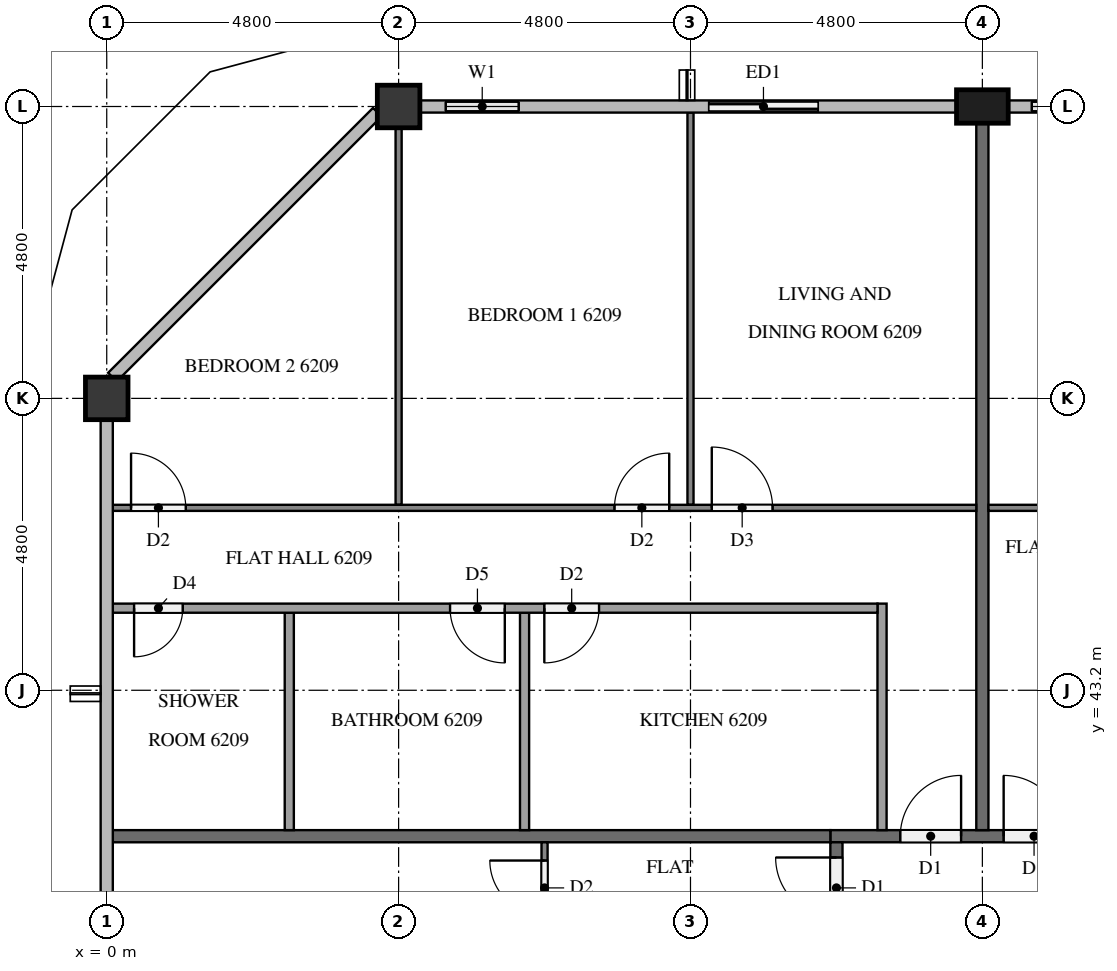
"""IFC4 building model, lengths in metres.
Left out: names, types, materials, properties, quantities, classifications, styles, units other than length and angle.
Written with IfcOpenShell. Run it as: python <this file> out.ifc"""

import sys

from ifc_helpers import new_model, si_unit, direction, frame, frame_2d, origin, origin_2d, place, context, subcontext, project, spatial, rectangle, extrude, element, fill, save


model = new_model("IFC4")
c1 = context("Model", 3, precision=1e-05, world=origin(), true_north=direction((0.0, 1.0)))
c2 = subcontext(c1, "Body", "Model", "MODEL_VIEW")
j1 = project(units=[si_unit("LENGTHUNIT", "METRE"), si_unit("PLANEANGLEUNIT", "RADIAN")], contexts=[c1])
p1 = place(None, origin())
s1 = spatial("IfcSite", under=j1, at=p1, CompositionType="ELEMENT")
p2 = place(p1, origin())
s2 = spatial("IfcBuilding", under=s1, at=p2, CompositionType="ELEMENT")
p3 = place(p2, frame((0.0, 0.0, 238.7)))
s3 = spatial("IfcBuildingStorey", under=s2, at=p3, CompositionType="ELEMENT", Elevation=238.7)
p4 = place(p3, frame((14.4, 52.8, 0.0), z_axis=(0.0, 0.0, 1.0), x_axis=(1.0, 0.0, 0.0)))
e1 = element("IfcColumn", 1, at=p4, inside=s3, PredefinedType="COLUMN", context=c2, shape_type="SweptSolid", body=[
    extrude(rectangle(XDim=0.85, YDim=0.55, at=origin_2d()), origin(), (0.0, 0.0, 1.0), 3.2),
])
for number, where, z_axis, x_axis in (
    (2, (4.8, 52.8, 0.0), (0.0, 0.0, 1.0), (1.0, 0.0, 0.0)),
    (3, (0.0, 48.0, 0.0), (0.0, 0.0, 1.0), (1.0, 0.0, 0.0)),
):
    element("IfcColumn", number, at=place(p3, frame(where, z_axis=z_axis, x_axis=x_axis)), inside=s3, PredefinedType="COLUMN", context=c2, shape_type="SweptSolid", body=[
        extrude(rectangle(XDim=0.7, YDim=0.7, at=origin_2d()), origin(), (0.0, 0.0, 1.0), 3.2),
    ])
p5 = place(p3, frame((16.8, 52.8, 0.0), z_axis=(0.0, 0.0, 1.0), x_axis=(-1.0, 0.0, 0.0)))
e4 = element("IfcWall", 4, at=p5, inside=s3, PredefinedType="SOLIDWALL", context=c2, shape_type="SweptSolid", body=[
    extrude(rectangle(XDim=1.975, YDim=0.15, at=frame_2d((0.988, 0.0))), origin(), (0.0, 0.0, 1.0), 3.2),
])
p6 = place(p5, frame((0.387, 0.0, 0.9)))
e5 = element("IfcOpeningElement", 5, at=p6, cuts=e4, PredefinedType="OPENING", context=c2, shape_type="SweptSolid", body=[
    extrude(rectangle(XDim=1.2, YDim=1.4, at=frame_2d((0.6, 0.7))), frame((0.0, 0.085, 0.0), z_axis=(0.0, -1.0, 0.0), x_axis=(1.0, 0.0, 0.0)), (0.0, 0.0, 1.0), 0.17),
])
p7 = place(p3, frame((12.0, 52.8, 0.0), z_axis=(0.0, 0.0, 1.0), x_axis=(-1.0, 0.0, 0.0)))
e6 = element("IfcWall", 6, at=p7, inside=s3, PredefinedType="SOLIDWALL", context=c2, shape_type="SweptSolid", body=[
    extrude(rectangle(XDim=2.4, YDim=0.15, at=frame_2d((1.2, 0.0))), origin(), (0.0, 0.0, 1.0), 3.2),
])
p8 = place(p7, frame((0.3, 0.0, 0.0)))
e7 = element("IfcOpeningElement", 7, at=p8, cuts=e6, PredefinedType="OPENING", context=c2, shape_type="SweptSolid", body=[
    extrude(rectangle(XDim=1.8, YDim=2.4, at=frame_2d((0.9, 1.2))), frame((0.0, 0.085, 0.0), z_axis=(0.0, -1.0, 0.0), x_axis=(1.0, 0.0, 0.0)), (0.0, 0.0, 1.0), 0.17),
])
p9 = place(p3, frame((7.2, 52.8, 0.0), z_axis=(0.0, 0.0, 1.0), x_axis=(-1.0, 0.0, 0.0)))
e8 = element("IfcWall", 8, at=p9, inside=s3, PredefinedType="SOLIDWALL", context=c2, shape_type="SweptSolid", body=[
    extrude(rectangle(XDim=2.05, YDim=0.15, at=frame_2d((1.025, 0.0))), origin(), (0.0, 0.0, 1.0), 3.2),
])
p10 = place(p9, frame((0.425, 0.0, 0.9)))
e9 = element("IfcOpeningElement", 9, at=p10, cuts=e8, PredefinedType="OPENING", context=c2, shape_type="SweptSolid", body=[
    extrude(rectangle(XDim=1.2, YDim=1.4, at=frame_2d((0.6, 0.7))), frame((0.0, 0.085, 0.0), z_axis=(0.0, -1.0, 0.0), x_axis=(1.0, 0.0, 0.0)), (0.0, 0.0, 1.0), 0.17),
])
p11 = place(p3, frame((11.9, 40.8, 0.0), z_axis=(0.0, 0.0, 1.0), x_axis=(1.0, 0.0, 0.0)))
e10 = element("IfcWall", 10, at=p11, inside=s3, PredefinedType="PARTITIONING", context=c2, shape_type="SweptSolid", body=[
    extrude(rectangle(XDim=38.6, YDim=0.2, at=frame_2d((19.3, 0.0))), origin(), (0.0, 0.0, 1.0), 3.2),
])
p12 = place(p11, frame((34.05, 0.0, 0.0)))
e11 = element("IfcOpeningElement", 11, at=p12, cuts=e10, PredefinedType="OPENING", context=c2, shape_type="SweptSolid", body=[
    extrude(rectangle(XDim=1.0, YDim=2.1, at=frame_2d((0.5, 1.05))), frame((0.0, 0.11, 0.0), z_axis=(0.0, -1.0, 0.0), x_axis=(1.0, 0.0, 0.0)), (0.0, 0.0, 1.0), 0.22),
])
p13 = place(p11, frame((32.3, 0.0, 0.0)))
e12 = element("IfcOpeningElement", 12, at=p13, cuts=e10, PredefinedType="OPENING", context=c2, shape_type="SweptSolid", body=[
    extrude(rectangle(XDim=1.1, YDim=2.1, at=frame_2d((0.55, 1.05))), frame((0.0, 0.11, 0.0), z_axis=(0.0, -1.0, 0.0), x_axis=(1.0, 0.0, 0.0)), (0.0, 0.0, 1.0), 0.22),
])
p14 = place(p11, frame((2.85, 0.0, 0.0)))
e13 = element("IfcOpeningElement", 13, at=p14, cuts=e10, PredefinedType="OPENING", context=c2, shape_type="SweptSolid", body=[
    extrude(rectangle(XDim=1.0, YDim=2.1, at=frame_2d((0.5, 1.05))), frame((0.0, 0.11, 0.0), z_axis=(0.0, -1.0, 0.0), x_axis=(1.0, 0.0, 0.0)), (0.0, 0.0, 1.0), 0.22),
])
p15 = place(p11, frame((1.15, 0.0, 0.0)))
e14 = element("IfcOpeningElement", 14, at=p15, cuts=e10, PredefinedType="OPENING", context=c2, shape_type="SweptSolid", body=[
    extrude(rectangle(XDim=1.0, YDim=2.1, at=frame_2d((0.5, 1.05))), frame((0.0, 0.11, 0.0), z_axis=(0.0, -1.0, 0.0), x_axis=(1.0, 0.0, 0.0)), (0.0, 0.0, 1.0), 0.22),
])
p16 = place(p3, frame((12.0, 12.1, 0.0), z_axis=(0.0, 0.0, 1.0), x_axis=(0.0, 1.0, 0.0)))
e15 = element("IfcWall", 15, at=p16, inside=s3, PredefinedType="PARTITIONING", context=c2, shape_type="SweptSolid", body=[
    extrude(rectangle(XDim=28.6, YDim=0.2, at=frame_2d((14.3, 0.0))), origin(), (0.0, 0.0, 1.0), 3.2),
])
p17 = place(p16, frame((27.35, 0.0, 0.0)))
e16 = element("IfcOpeningElement", 16, at=p17, cuts=e15, PredefinedType="OPENING", context=c2, shape_type="SweptSolid", body=[
    extrude(rectangle(XDim=1.0, YDim=2.1, at=frame_2d((0.5, 1.05))), frame((0.0, 0.11, 0.0), z_axis=(0.0, -1.0, 0.0), x_axis=(1.0, 0.0, 0.0)), (0.0, 0.0, 1.0), 0.22),
])
p18 = place(p16, frame((17.75, 0.0, 0.0)))
e17 = element("IfcOpeningElement", 17, at=p18, cuts=e15, PredefinedType="OPENING", context=c2, shape_type="SweptSolid", body=[
    extrude(rectangle(XDim=1.0, YDim=2.1, at=frame_2d((0.5, 1.05))), frame((0.0, 0.11, 0.0), z_axis=(0.0, -1.0, 0.0), x_axis=(1.0, 0.0, 0.0)), (0.0, 0.0, 1.0), 0.22),
])
p19 = place(p16, frame((3.35, 0.0, 0.0)))
e18 = element("IfcOpeningElement", 18, at=p19, cuts=e15, PredefinedType="OPENING", context=c2, shape_type="SweptSolid", body=[
    extrude(rectangle(XDim=1.0, YDim=2.1, at=frame_2d((0.5, 1.05))), frame((0.0, 0.11, 0.0), z_axis=(0.0, -1.0, 0.0), x_axis=(1.0, 0.0, 0.0)), (0.0, 0.0, 1.0), 0.22),
])
p20 = place(p3, frame((14.4, 52.525, 0.0), z_axis=(0.0, 0.0, 1.0), x_axis=(0.0, -1.0, 0.0)))
e19 = element("IfcWall", 19, at=p20, inside=s3, PredefinedType="PARTITIONING", context=c2, shape_type="SweptSolid", body=[
    extrude(rectangle(XDim=11.625, YDim=0.2, at=frame_2d((5.812, 0.0))), origin(), (0.0, 0.0, 1.0), 3.2),
])
p21 = place(p3, frame((0.1, 40.8, 0.0), z_axis=(0.0, 0.0, 1.0), x_axis=(1.0, 0.0, 0.0)))
e20 = element("IfcWall", 20, at=p21, inside=s3, PredefinedType="PARTITIONING", context=c2, shape_type="SweptSolid", body=[
    extrude(rectangle(XDim=11.8, YDim=0.2, at=frame_2d((5.9, 0.0))), origin(), (0.0, 0.0, 1.0), 3.2),
])
p22 = place(p3, frame((14.5, 46.2, 0.0), z_axis=(0.0, 0.0, 1.0), x_axis=(1.0, 0.0, 0.0)))
e21 = element("IfcWall", 21, at=p22, inside=s3, PredefinedType="PARTITIONING", context=c2, shape_type="SweptSolid", body=[
    extrude(rectangle(XDim=11.8, YDim=0.1, at=frame_2d((5.9, 0.0))), origin(), (0.0, 0.0, 1.0), 3.2),
])
p23 = place(p22, frame((3.45, 0.0, 0.0)))
e22 = element("IfcOpeningElement", 22, at=p23, cuts=e21, PredefinedType="OPENING", context=c2, shape_type="SweptSolid", body=[
    extrude(rectangle(XDim=0.9, YDim=2.1, at=frame_2d((0.45, 1.05))), frame((0.0, 0.06, 0.0), z_axis=(0.0, -1.0, 0.0), x_axis=(1.0, 0.0, 0.0)), (0.0, 0.0, 1.0), 0.12),
])
p24 = place(p22, frame((5.05, 0.0, 0.0)))
e23 = element("IfcOpeningElement", 23, at=p24, cuts=e21, PredefinedType="OPENING", context=c2, shape_type="SweptSolid", body=[
    extrude(rectangle(XDim=1.0, YDim=2.1, at=frame_2d((0.5, 1.05))), frame((0.0, 0.06, 0.0), z_axis=(0.0, -1.0, 0.0), x_axis=(1.0, 0.0, 0.0)), (0.0, 0.0, 1.0), 0.12),
])
p25 = place(p3, frame((9.6, 46.25, 0.0), z_axis=(0.0, 0.0, 1.0), x_axis=(0.0, 1.0, 0.0)))
e24 = element("IfcWall", 24, at=p25, inside=s3, PredefinedType="PARTITIONING", context=c2, shape_type="SweptSolid", body=[
    extrude(rectangle(XDim=6.45, YDim=0.1, at=frame_2d((3.225, 0.0))), origin(), (0.0, 0.0, 1.0), 3.2),
])
p26 = place(p3, frame((4.8, 46.25, 0.0), z_axis=(0.0, 0.0, 1.0), x_axis=(0.0, 1.0, 0.0)))
e25 = element("IfcWall", 25, at=p26, inside=s3, PredefinedType="PARTITIONING", context=c2, shape_type="SweptSolid", body=[
    extrude(rectangle(XDim=6.2, YDim=0.1, at=frame_2d((3.1, 0.0))), origin(), (0.0, 0.0, 1.0), 3.2),
])
p27 = place(p3, frame((0.1, 46.2, 0.0), z_axis=(0.0, 0.0, 1.0), x_axis=(1.0, 0.0, 0.0)))
e26 = element("IfcWall", 26, at=p27, inside=s3, PredefinedType="PARTITIONING", context=c2, shape_type="SweptSolid", body=[
    extrude(rectangle(XDim=14.2, YDim=0.1, at=frame_2d((7.1, 0.0))), origin(), (0.0, 0.0, 1.0), 3.2),
])
p28 = place(p27, frame((9.85, 0.0, 0.0)))
e27 = element("IfcOpeningElement", 27, at=p28, cuts=e26, PredefinedType="OPENING", context=c2, shape_type="SweptSolid", body=[
    extrude(rectangle(XDim=1.0, YDim=2.1, at=frame_2d((0.5, 1.05))), frame((0.0, 0.06, 0.0), z_axis=(0.0, -1.0, 0.0), x_axis=(1.0, 0.0, 0.0)), (0.0, 0.0, 1.0), 0.12),
])
p29 = place(p27, frame((8.25, 0.0, 0.0)))
e28 = element("IfcOpeningElement", 28, at=p29, cuts=e26, PredefinedType="OPENING", context=c2, shape_type="SweptSolid", body=[
    extrude(rectangle(XDim=0.9, YDim=2.1, at=frame_2d((0.45, 1.05))), frame((0.0, 0.06, 0.0), z_axis=(0.0, -1.0, 0.0), x_axis=(1.0, 0.0, 0.0)), (0.0, 0.0, 1.0), 0.12),
])
p30 = place(p27, frame((0.3, 0.0, 0.0)))
e29 = element("IfcOpeningElement", 29, at=p30, cuts=e26, PredefinedType="OPENING", context=c2, shape_type="SweptSolid", body=[
    extrude(rectangle(XDim=0.9, YDim=2.1, at=frame_2d((0.45, 1.05))), frame((0.0, 0.06, 0.0), z_axis=(0.0, -1.0, 0.0), x_axis=(1.0, 0.0, 0.0)), (0.0, 0.0, 1.0), 0.12),
])
for number, where, z_axis, x_axis in (
    (30, (6.871, 40.9, 0.0), (0.0, 0.0, 1.0), (0.0, 1.0, 0.0)),
    (31, (3.002, 40.9, 0.0), (0.0, 0.0, 1.0), (0.0, 1.0, 0.0)),
):
    element("IfcWall", number, at=place(p3, frame(where, z_axis=z_axis, x_axis=x_axis)), inside=s3, PredefinedType="PARTITIONING", context=c2, shape_type="SweptSolid", body=[
        extrude(rectangle(XDim=3.575, YDim=0.15, at=frame_2d((1.788, 0.0))), origin(), (0.0, 0.0, 1.0), 3.2),
    ])
p31 = place(p3, frame((12.75, 40.9, 0.0), z_axis=(0.0, 0.0, 1.0), x_axis=(0.0, 1.0, 0.0)))
e32 = element("IfcWall", 32, at=p31, inside=s3, PredefinedType="PARTITIONING", context=c2, shape_type="SweptSolid", body=[
    extrude(rectangle(XDim=3.725, YDim=0.15, at=frame_2d((1.863, 0.0))), origin(), (0.0, 0.0, 1.0), 3.2),
])
p32 = place(p3, frame((12.675, 44.55, 0.0), z_axis=(0.0, 0.0, 1.0), x_axis=(-1.0, 0.0, 0.0)))
e33 = element("IfcWall", 33, at=p32, inside=s3, PredefinedType="PARTITIONING", context=c2, shape_type="SweptSolid", body=[
    extrude(rectangle(XDim=12.575, YDim=0.15, at=frame_2d((6.288, 0.0))), origin(), (0.0, 0.0, 1.0), 3.2),
])
p33 = place(p32, frame((4.579, 0.0, 0.0)))
e34 = element("IfcOpeningElement", 34, at=p33, cuts=e33, PredefinedType="OPENING", context=c2, shape_type="SweptSolid", body=[
    extrude(rectangle(XDim=0.9, YDim=2.1, at=frame_2d((0.45, 1.05))), frame((0.0, 0.085, 0.0), z_axis=(0.0, -1.0, 0.0), x_axis=(1.0, 0.0, 0.0)), (0.0, 0.0, 1.0), 0.17),
])
p34 = place(p32, frame((6.129, 0.0, 0.0)))
e35 = element("IfcOpeningElement", 35, at=p34, cuts=e33, PredefinedType="OPENING", context=c2, shape_type="SweptSolid", body=[
    extrude(rectangle(XDim=0.9, YDim=2.1, at=frame_2d((0.45, 1.05))), frame((0.0, 0.085, 0.0), z_axis=(0.0, -1.0, 0.0), x_axis=(1.0, 0.0, 0.0)), (0.0, 0.0, 1.0), 0.17),
])
p35 = place(p32, frame((11.425, 0.0, 0.0)))
e36 = element("IfcOpeningElement", 36, at=p35, cuts=e33, PredefinedType="OPENING", context=c2, shape_type="SweptSolid", body=[
    extrude(rectangle(XDim=0.8, YDim=2.1, at=frame_2d((0.4, 1.05))), frame((0.0, 0.085, 0.0), z_axis=(0.0, -1.0, 0.0), x_axis=(1.0, 0.0, 0.0)), (0.0, 0.0, 1.0), 0.17),
])
p36 = place(p3, frame((7.2, 31.3, 0.0), z_axis=(0.0, 0.0, 1.0), x_axis=(0.0, 1.0, 0.0)))
e37 = element("IfcWall", 37, at=p36, inside=s3, PredefinedType="PARTITIONING", context=c2, shape_type="SweptSolid", body=[
    extrude(rectangle(XDim=9.4, YDim=0.1, at=frame_2d((4.7, 0.0))), origin(), (0.0, 0.0, 1.0), 3.2),
])
p37 = place(p36, frame((8.2, 0.0, 0.0)))
e38 = element("IfcOpeningElement", 38, at=p37, cuts=e37, PredefinedType="OPENING", context=c2, shape_type="SweptSolid", body=[
    extrude(rectangle(XDim=0.9, YDim=2.1, at=frame_2d((0.45, 1.05))), frame((0.0, 0.06, 0.0), z_axis=(0.0, -1.0, 0.0), x_axis=(1.0, 0.0, 0.0)), (0.0, 0.0, 1.0), 0.12),
])
p38 = place(p36, frame((0.3, 0.0, 0.0)))
e39 = element("IfcOpeningElement", 39, at=p38, cuts=e37, PredefinedType="OPENING", context=c2, shape_type="SweptSolid", body=[
    extrude(rectangle(XDim=1.0, YDim=2.1, at=frame_2d((0.5, 1.05))), frame((0.0, 0.06, 0.0), z_axis=(0.0, -1.0, 0.0), x_axis=(1.0, 0.0, 0.0)), (0.0, 0.0, 1.0), 0.12),
])
p39 = place(p6, origin())
e40 = element("IfcWindow", 40, at=p39, inside=s3, PartitioningType="SINGLE_PANEL", PredefinedType="WINDOW", context=c2, shape_type="SweptSolid", body=[
    extrude(rectangle(XDim=1.2, YDim=1.4, at=frame_2d((0.6, 0.7))), frame((0.0, 0.03, 0.0), z_axis=(0.0, -1.0, 0.0), x_axis=(1.0, 0.0, 0.0)), (0.0, 0.0, 1.0), 0.06),
])
fill(e5, e40)
p40 = place(p8, origin())
e41 = element("IfcDoor", 41, at=p40, inside=s3, OperationType="SLIDING_TO_RIGHT", PredefinedType="DOOR", context=c2, shape_type="SweptSolid", body=[
    extrude(rectangle(XDim=1.8, YDim=2.4, at=frame_2d((0.9, 1.2))), frame((0.0, 0.025, 0.0), z_axis=(0.0, -1.0, 0.0), x_axis=(1.0, 0.0, 0.0)), (0.0, 0.0, 1.0), 0.05),
])
fill(e7, e41)
p41 = place(p10, origin())
e42 = element("IfcWindow", 42, at=p41, inside=s3, PartitioningType="SINGLE_PANEL", PredefinedType="WINDOW", context=c2, shape_type="SweptSolid", body=[
    extrude(rectangle(XDim=1.2, YDim=1.4, at=frame_2d((0.6, 0.7))), frame((0.0, 0.03, 0.0), z_axis=(0.0, -1.0, 0.0), x_axis=(1.0, 0.0, 0.0)), (0.0, 0.0, 1.0), 0.06),
])
fill(e9, e42)
p42 = place(p14, origin())
e43 = element("IfcDoor", 43, at=p42, inside=s3, OperationType="SINGLE_SWING_LEFT", PredefinedType="DOOR", context=c2, shape_type="SweptSolid", body=[
    extrude(rectangle(XDim=1.0, YDim=2.1, at=frame_2d((0.5, 1.05))), frame((0.0, 0.025, 0.0), z_axis=(0.0, -1.0, 0.0), x_axis=(1.0, 0.0, 0.0)), (0.0, 0.0, 1.0), 0.05),
])
fill(e13, e43)
p43 = place(p15, origin())
e44 = element("IfcDoor", 44, at=p43, inside=s3, OperationType="SINGLE_SWING_RIGHT", PredefinedType="DOOR", context=c2, shape_type="SweptSolid", body=[
    extrude(rectangle(XDim=1.0, YDim=2.1, at=frame_2d((0.5, 1.05))), frame((0.0, 0.025, 0.0), z_axis=(0.0, -1.0, 0.0), x_axis=(1.0, 0.0, 0.0)), (0.0, 0.0, 1.0), 0.05),
])
fill(e14, e44)
p44 = place(p17, origin())
e45 = element("IfcDoor", 45, at=p44, inside=s3, OperationType="SINGLE_SWING_RIGHT", PredefinedType="DOOR", context=c2, shape_type="SweptSolid", body=[
    extrude(rectangle(XDim=1.0, YDim=2.1, at=frame_2d((0.5, 1.05))), frame((0.0, 0.025, 0.0), z_axis=(0.0, -1.0, 0.0), x_axis=(1.0, 0.0, 0.0)), (0.0, 0.0, 1.0), 0.05),
])
fill(e16, e45)
p45 = place(p28, origin())
e46 = element("IfcDoor", 46, at=p45, inside=s3, OperationType="SINGLE_SWING_LEFT", PredefinedType="DOOR", context=c2, shape_type="SweptSolid", body=[
    extrude(rectangle(XDim=1.0, YDim=2.1, at=frame_2d((0.5, 1.05))), frame((0.0, 0.025, 0.0), z_axis=(0.0, -1.0, 0.0), x_axis=(1.0, 0.0, 0.0)), (0.0, 0.0, 1.0), 0.05),
])
fill(e27, e46)
p46 = place(p29, origin())
e47 = element("IfcDoor", 47, at=p46, inside=s3, OperationType="SINGLE_SWING_RIGHT", PredefinedType="DOOR", context=c2, shape_type="SweptSolid", body=[
    extrude(rectangle(XDim=0.9, YDim=2.1, at=frame_2d((0.45, 1.05))), frame((0.0, 0.025, 0.0), z_axis=(0.0, -1.0, 0.0), x_axis=(1.0, 0.0, 0.0)), (0.0, 0.0, 1.0), 0.05),
])
fill(e28, e47)
p47 = place(p30, origin())
e48 = element("IfcDoor", 48, at=p47, inside=s3, OperationType="SINGLE_SWING_LEFT", PredefinedType="DOOR", context=c2, shape_type="SweptSolid", body=[
    extrude(rectangle(XDim=0.9, YDim=2.1, at=frame_2d((0.45, 1.05))), frame((0.0, 0.025, 0.0), z_axis=(0.0, -1.0, 0.0), x_axis=(1.0, 0.0, 0.0)), (0.0, 0.0, 1.0), 0.05),
])
fill(e29, e48)
p48 = place(p33, origin())
e49 = element("IfcDoor", 49, at=p48, inside=s3, OperationType="SINGLE_SWING_RIGHT", PredefinedType="DOOR", context=c2, shape_type="SweptSolid", body=[
    extrude(rectangle(XDim=0.9, YDim=2.1, at=frame_2d((0.45, 1.05))), frame((0.0, 0.025, 0.0), z_axis=(0.0, -1.0, 0.0), x_axis=(1.0, 0.0, 0.0)), (0.0, 0.0, 1.0), 0.05),
])
fill(e34, e49)
p49 = place(p34, origin())
e50 = element("IfcDoor", 50, at=p49, inside=s3, OperationType="SINGLE_SWING_LEFT", PredefinedType="DOOR", context=c2, shape_type="SweptSolid", body=[
    extrude(rectangle(XDim=0.9, YDim=2.1, at=frame_2d((0.45, 1.05))), frame((0.0, 0.025, 0.0), z_axis=(0.0, -1.0, 0.0), x_axis=(1.0, 0.0, 0.0)), (0.0, 0.0, 1.0), 0.05),
])
fill(e35, e50)
p50 = place(p35, origin())
e51 = element("IfcDoor", 51, at=p50, inside=s3, OperationType="SINGLE_SWING_RIGHT", PredefinedType="DOOR", context=c2, shape_type="SweptSolid", body=[
    extrude(rectangle(XDim=0.8, YDim=2.1, at=frame_2d((0.4, 1.05))), frame((0.0, 0.025, 0.0), z_axis=(0.0, -1.0, 0.0), x_axis=(1.0, 0.0, 0.0)), (0.0, 0.0, 1.0), 0.05),
])
fill(e36, e51)
p51 = place(p37, origin())
e52 = element("IfcDoor", 52, at=p51, inside=s3, OperationType="SINGLE_SWING_RIGHT", PredefinedType="DOOR", context=c2, shape_type="SweptSolid", body=[
    extrude(rectangle(XDim=0.9, YDim=2.1, at=frame_2d((0.45, 1.05))), frame((0.0, 0.025, 0.0), z_axis=(0.0, -1.0, 0.0), x_axis=(1.0, 0.0, 0.0)), (0.0, 0.0, 1.0), 0.05),
])
fill(e38, e52)
save(model, sys.argv[1])
